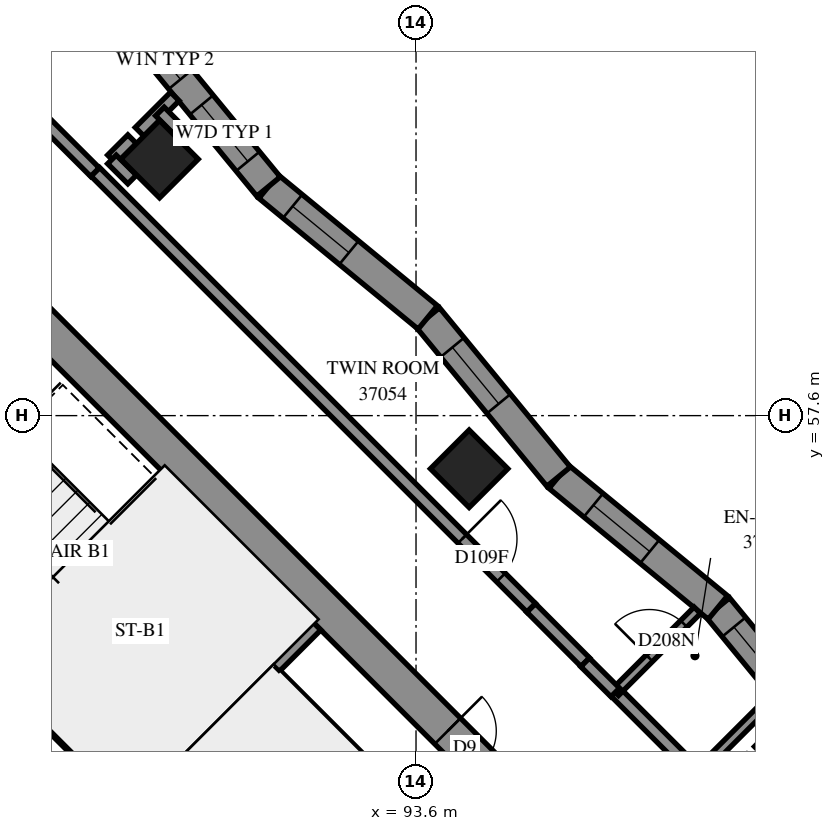
"""IFC4 building model, lengths in metres.
Left out: names, types, materials, properties, quantities, classifications, styles, units other than length and angle.
Written with IfcOpenShell. Run it as: python <this file> out.ifc"""

import sys

from ifc_helpers import new_model, si_unit, direction, frame, frame_2d, origin, origin_2d, place, context, subcontext, project, spatial, polyline, rectangle, outline, extrude, element, fill, save


model = new_model("IFC4")
c1 = context("Model", 3, precision=1e-05, world=origin(), true_north=direction((0.0, 1.0)))
c2 = subcontext(c1, "Body", "Model", "MODEL_VIEW")
j1 = project(units=[si_unit("LENGTHUNIT", "METRE"), si_unit("PLANEANGLEUNIT", "RADIAN")], contexts=[c1])
p1 = place(None, origin())
s1 = spatial("IfcSite", under=j1, at=p1, CompositionType="ELEMENT")
p2 = place(p1, origin())
s2 = spatial("IfcBuilding", under=s1, at=p2, CompositionType="ELEMENT")
p3 = place(p2, frame((0.0, 0.0, 138.8)))
s3 = spatial("IfcBuildingStorey", under=s2, at=p3, CompositionType="ELEMENT", Elevation=138.8)
for number, where, z_axis, x_axis in (
    (1, (89.382, 61.818, 0.0), (0.0, 0.0, 1.0), (0.707, -0.707, 0.0)),
    (2, (94.474, 56.727, 0.0), (0.0, 0.0, 1.0), (0.707, -0.707, 0.0)),
    (3, (99.565, 51.635, 0.0), (0.0, 0.0, 1.0), (0.707, -0.707, 0.0)),
):
    element("IfcColumn", number, at=place(p3, frame(where, z_axis=z_axis, x_axis=x_axis)), inside=s3, PredefinedType="COLUMN", context=c2, shape_type="SweptSolid", body=[
        extrude(rectangle(XDim=0.9, YDim=0.9, at=origin_2d()), origin(), (0.0, 0.0, 1.0), 3.1),
    ])
p4 = place(p3, frame((86.625, 59.908, -0.3), z_axis=(0.0, 0.0, 1.0), x_axis=(0.7071067812, -0.7071067812, 0.0)))
e4 = element("IfcWall", 4, at=p4, inside=s3, PredefinedType="SHEAR", context=c2, shape_type="SweptSolid", body=[
    extrude(rectangle(XDim=15.6, YDim=0.6, at=frame_2d((7.8, 0.0))), origin(), (0.0, 0.0, 1.0), 2.7),
])
p5 = place(p4, frame((10.6, 0.0, 0.3)))
e5 = element("IfcOpeningElement", 5, at=p5, cuts=e4, PredefinedType="OPENING", context=c2, shape_type="SweptSolid", body=[
    extrude(rectangle(XDim=0.8, YDim=2.1, at=frame_2d((0.4, 1.05))), frame((0.0, 0.31, 0.0), z_axis=(0.0, -1.0, 0.0), x_axis=(1.0, 0.0, 0.0)), (0.0, 0.0, 1.0), 0.62),
])
p6 = place(p3, frame((81.534, 53.969, 0.0), z_axis=(0.0, 0.0, 1.0), x_axis=(0.707103309, -0.7071102534, 0.0)))
e6 = element("IfcWall", 6, at=p6, inside=s3, PredefinedType="SOLIDWALL", context=c2, shape_type="SweptSolid", body=[
    extrude(rectangle(XDim=14.4, YDim=0.3, at=frame_2d((7.2, 0.0))), origin(), (0.0, 0.0, 1.0), 3.1),
])
p7 = place(p6, frame((1.25, 0.0, 0.0)))
e7 = element("IfcOpeningElement", 7, at=p7, cuts=e6, PredefinedType="OPENING", context=c2, shape_type="SweptSolid", body=[
    extrude(rectangle(XDim=1.1, YDim=2.1, at=frame_2d((0.55, 1.05))), frame((0.0, 0.16, 0.0), z_axis=(0.0, -1.0, 0.0), x_axis=(1.0, 0.0, 0.0)), (0.0, 0.0, 1.0), 0.32),
])
p8 = place(p6, frame((4.85, 0.0, 0.0)))
e8 = element("IfcOpeningElement", 8, at=p8, cuts=e6, PredefinedType="OPENING", context=c2, shape_type="SweptSolid", body=[
    extrude(rectangle(XDim=1.1, YDim=2.1, at=frame_2d((0.55, 1.05))), frame((0.0, 0.16, 0.0), z_axis=(0.0, -1.0, 0.0), x_axis=(1.0, 0.0, 0.0)), (0.0, 0.0, 1.0), 0.32),
])
p9 = place(p6, frame((8.45, 0.0, 0.0)))
e9 = element("IfcOpeningElement", 9, at=p9, cuts=e6, PredefinedType="OPENING", context=c2, shape_type="SweptSolid", body=[
    extrude(rectangle(XDim=1.1, YDim=2.1, at=frame_2d((0.55, 1.05))), frame((0.0, 0.16, 0.0), z_axis=(0.0, -1.0, 0.0), x_axis=(1.0, 0.0, 0.0)), (0.0, 0.0, 1.0), 0.32),
])
p10 = place(p6, frame((12.05, 0.0, 0.0)))
e10 = element("IfcOpeningElement", 10, at=p10, cuts=e6, PredefinedType="OPENING", context=c2, shape_type="SweptSolid", body=[
    extrude(rectangle(XDim=1.1, YDim=2.1, at=frame_2d((0.55, 1.05))), frame((0.0, 0.16, 0.0), z_axis=(0.0, -1.0, 0.0), x_axis=(1.0, 0.0, 0.0)), (0.0, 0.0, 1.0), 0.32),
])
p11 = place(p3, frame((83.867, 56.302, 0.0), z_axis=(0.0, 0.0, 1.0), x_axis=(0.7071137256, -0.7070998367, 0.0)))
e11 = element("IfcWall", 11, at=p11, inside=s3, PredefinedType="SOLIDWALL", context=c2, shape_type="SweptSolid", body=[
    extrude(rectangle(XDim=7.2, YDim=0.3, at=frame_2d((3.6, 0.0))), origin(), (0.0, 0.0, 1.0), 3.1),
])
p12 = place(p3, frame((88.958, 51.211, 0.0), z_axis=(0.0, 0.0, 1.0), x_axis=(0.7071067812, 0.7071067812, 0.0)))
e12 = element("IfcWall", 12, at=p12, inside=s3, PredefinedType="SOLIDWALL", context=c2, shape_type="SweptSolid", body=[
    extrude(rectangle(XDim=4.2, YDim=0.3, at=frame_2d((2.1, 0.0))), origin(), (0.0, 0.0, 1.0), 3.1),
])
p13 = place(p3, frame((100.716, 51.826, 0.0), z_axis=(0.0, 0.0, 1.0), x_axis=(-0.6349054988, 0.7725898055, 0.0)))
e13 = element("IfcWall", 13, at=p13, inside=s3, PredefinedType="SOLIDWALL", context=c2, shape_type="SweptSolid", body=[
    extrude(outline(polyline([(0.025, -0.25), (3.414, -0.25), (3.365, 0.25), (-0.025, 0.25), (0.025, -0.25)])), origin(), (0.0, 0.0, 1.0), 3.1),
])
p14 = place(p13, frame((1.774, 0.0, 0.45)))
e14 = element("IfcOpeningElement", 14, at=p14, cuts=e13, PredefinedType="OPENING", context=c2, shape_type="SweptSolid", body=[
    extrude(rectangle(XDim=1.2, YDim=2.5, at=frame_2d((0.6, 1.25))), frame((0.0, 0.26, 0.0), z_axis=(0.0, -1.0, 0.0), x_axis=(1.0, 0.0, 0.0)), (0.0, 0.0, 1.0), 0.52),
])
p15 = place(p3, frame((98.564, 54.445, 0.0), z_axis=(0.0, 0.0, 1.0), x_axis=(-0.7725898055, 0.6349054988, 0.0)))
e15 = element("IfcWall", 15, at=p15, inside=s3, PredefinedType="SOLIDWALL", context=c2, shape_type="SweptSolid", body=[
    extrude(outline(polyline([(-0.025, -0.25), (3.365, -0.25), (3.414, 0.25), (0.025, 0.25), (-0.025, -0.25)])), origin(), (0.0, 0.0, 1.0), 3.1),
])
p16 = place(p15, frame((1.45, 0.0, 0.45)))
e16 = element("IfcOpeningElement", 16, at=p16, cuts=e15, PredefinedType="OPENING", context=c2, shape_type="SweptSolid", body=[
    extrude(rectangle(XDim=1.2, YDim=2.5, at=frame_2d((0.6, 1.25))), frame((0.0, 0.26, 0.0), z_axis=(0.0, -1.0, 0.0), x_axis=(1.0, 0.0, 0.0)), (0.0, 0.0, 1.0), 0.52),
])
p17 = place(p3, frame((95.945, 56.597, 0.0), z_axis=(0.0, 0.0, 1.0), x_axis=(-0.6349054988, 0.7725898055, 0.0)))
e17 = element("IfcWall", 17, at=p17, inside=s3, PredefinedType="SOLIDWALL", context=c2, shape_type="SweptSolid", body=[
    extrude(outline(polyline([(0.025, -0.25), (3.414, -0.25), (3.365, 0.25), (-0.025, 0.25), (0.025, -0.25)])), origin(), (0.0, 0.0, 1.0), 3.1),
])
p18 = place(p17, frame((1.552, 0.0, 0.45)))
e18 = element("IfcOpeningElement", 18, at=p18, cuts=e17, PredefinedType="OPENING", context=c2, shape_type="SweptSolid", body=[
    extrude(rectangle(XDim=1.2, YDim=2.5, at=frame_2d((0.6, 1.25))), frame((0.0, 0.26, 0.0), z_axis=(0.0, -1.0, 0.0), x_axis=(1.0, 0.0, 0.0)), (0.0, 0.0, 1.0), 0.52),
])
p19 = place(p3, frame((93.793, 59.215, 0.0), z_axis=(0.0, 0.0, 1.0), x_axis=(-0.7725898055, 0.6349054988, 0.0)))
e19 = element("IfcWall", 19, at=p19, inside=s3, PredefinedType="SOLIDWALL", context=c2, shape_type="SweptSolid", body=[
    extrude(outline(polyline([(-0.025, -0.25), (3.365, -0.25), (3.414, 0.25), (0.025, 0.25), (-0.025, -0.25)])), origin(), (0.0, 0.0, 1.0), 3.1),
])
p20 = place(p19, frame((1.677, 0.0, 0.45)))
e20 = element("IfcOpeningElement", 20, at=p20, cuts=e19, PredefinedType="OPENING", context=c2, shape_type="SweptSolid", body=[
    extrude(rectangle(XDim=1.2, YDim=2.5, at=frame_2d((0.6, 1.25))), frame((0.0, 0.26, 0.0), z_axis=(0.0, -1.0, 0.0), x_axis=(1.0, 0.0, 0.0)), (0.0, 0.0, 1.0), 0.52),
])
p21 = place(p3, frame((91.174, 61.368, 0.0), z_axis=(0.0, 0.0, 1.0), x_axis=(-0.6349199703, 0.7725779128, 0.0)))
e21 = element("IfcWall", 21, at=p21, inside=s3, PredefinedType="SOLIDWALL", context=c2, shape_type="SweptSolid", body=[
    extrude(outline(polyline([(0.025, -0.25), (3.414, -0.25), (3.365, 0.25), (-0.025, 0.25), (0.025, -0.25)])), origin(), (0.0, 0.0, 1.0), 3.1),
])
p22 = place(p21, frame((0.536, 0.0, 0.5)))
e22 = element("IfcOpeningElement", 22, at=p22, cuts=e21, PredefinedType="OPENING", context=c2, shape_type="SweptSolid", body=[
    extrude(rectangle(XDim=1.2, YDim=2.45, at=frame_2d((0.6, 1.225))), frame((0.0, 0.26, 0.0), z_axis=(0.0, -1.0, 0.0), x_axis=(1.0, 0.0, 0.0)), (0.0, 0.0, 1.0), 0.52),
])
p23 = place(p21, frame((2.281, 0.0, 0.45)))
e23 = element("IfcOpeningElement", 23, at=p23, cuts=e21, PredefinedType="OPENING", context=c2, shape_type="SweptSolid", body=[
    extrude(rectangle(XDim=0.8, YDim=2.5, at=frame_2d((0.4, 1.25))), frame((0.0, 0.26, 0.0), z_axis=(0.0, -1.0, 0.0), x_axis=(1.0, 0.0, 0.0)), (0.0, 0.0, 1.0), 0.52),
])
p24 = place(p3, frame((91.313, 53.354, 0.0), z_axis=(0.0, 0.0, 1.0), x_axis=(0.7071140275, -0.7070995348, 0.0)))
e24 = element("IfcWall", 24, at=p24, inside=s3, PredefinedType="PARTITIONING", context=c2, shape_type="SweptSolid", body=[
    extrude(rectangle(XDim=6.9, YDim=0.15, at=frame_2d((3.45, 0.0))), origin(), (0.0, 0.0, 1.0), 3.1),
])
p25 = place(p3, frame((88.326, 61.609, 0.0), z_axis=(0.0, 0.0, 1.0), x_axis=(0.7071067812, -0.7071067812, 0.0)))
e25 = element("IfcWall", 25, at=p25, inside=s3, PredefinedType="PARTITIONING", context=c2, shape_type="SweptSolid", body=[
    extrude(rectangle(XDim=10.14, YDim=0.2, at=frame_2d((5.07, 0.0))), origin(), (0.0, 0.0, 1.0), 3.1),
])
p26 = place(p25, frame((8.535, 0.0, 0.0)))
e26 = element("IfcOpeningElement", 26, at=p26, cuts=e25, PredefinedType="OPENING", context=c2, shape_type="SweptSolid", body=[
    extrude(rectangle(XDim=0.9, YDim=2.1, at=frame_2d((0.45, 1.05))), frame((0.0, 0.11, 0.0), z_axis=(0.0, -1.0, 0.0), x_axis=(1.0, 0.0, 0.0)), (0.0, 0.0, 1.0), 0.22),
])
p27 = place(p3, frame((86.834, 63.088, 0.0), z_axis=(0.0, 0.0, 1.0), x_axis=(0.7075827869, -0.7066304548, 0.0)))
e27 = element("IfcWall", 27, at=p27, inside=s3, PredefinedType="PARTITIONING", context=c2, shape_type="SweptSolid", body=[
    extrude(rectangle(XDim=2.1, YDim=0.2, at=frame_2d((1.05, 0.0))), origin(), (0.0, 0.0, 1.0), 3.1),
])
p28 = place(p3, frame((96.882, 53.053, 0.0), z_axis=(0.0, 0.0, 1.0), x_axis=(0.7071067812, -0.7071067812, 0.0)))
e28 = element("IfcWall", 28, at=p28, inside=s3, PredefinedType="PARTITIONING", context=c2, shape_type="SweptSolid", body=[
    extrude(rectangle(XDim=1.901, YDim=0.2, at=frame_2d((0.95, 0.0))), origin(), (0.0, 0.0, 1.0), 3.1),
])
p29 = place(p3, frame((96.877, 53.051, 0.0), z_axis=(0.0, 0.0, 1.0), x_axis=(0.7071330019, 0.7070805595, 0.0)))
e29 = element("IfcWall", 29, at=p29, inside=s3, PredefinedType="PARTITIONING", context=c2, shape_type="SweptSolid", body=[
    extrude(rectangle(XDim=1.907, YDim=0.15, at=frame_2d((0.954, 0.0))), origin(), (0.0, 0.0, 1.0), 3.1),
])
p30 = place(p29, frame((0.793, 0.0, 0.0)))
e30 = element("IfcOpeningElement", 30, at=p30, cuts=e29, PredefinedType="OPENING", context=c2, shape_type="SweptSolid", body=[
    extrude(rectangle(XDim=0.8, YDim=2.1, at=frame_2d((0.4, 1.05))), frame((0.0, 0.085, 0.0), z_axis=(0.0, -1.0, 0.0), x_axis=(1.0, 0.0, 0.0)), (0.0, 0.0, 1.0), 0.17),
])
p31 = place(p3, frame((98.221, 51.707, 0.0), z_axis=(0.0, 0.0, 1.0), x_axis=(0.7071351659, 0.7070783953, 0.0)))
e31 = element("IfcWall", 31, at=p31, inside=s3, PredefinedType="PARTITIONING", context=c2, shape_type="SweptSolid", body=[
    extrude(rectangle(XDim=1.762, YDim=0.15, at=frame_2d((0.881, 0.0))), origin(), (0.0, 0.0, 1.0), 3.1),
])
p32 = place(p3, frame((95.494, 54.438, 0.0), z_axis=(0.0, 0.0, 1.0), x_axis=(0.706312726, -0.7078999456, 0.0)))
e32 = element("IfcWall", 32, at=p32, inside=s3, PredefinedType="PARTITIONING", context=c2, shape_type="SweptSolid", body=[
    extrude(rectangle(XDim=1.26, YDim=0.2, at=frame_2d((0.63, 0.0))), origin(), (0.0, 0.0, 1.0), 3.1),
])
p33 = place(p3, frame((96.38, 53.542, 0.0), z_axis=(0.0, 0.0, 1.0), x_axis=(0.7085338339, -0.7056768426, 0.0)))
e33 = element("IfcWall", 33, at=p33, inside=s3, PredefinedType="PARTITIONING", context=c2, shape_type="SweptSolid", body=[
    extrude(rectangle(XDim=0.7, YDim=0.2, at=frame_2d((0.35, 0.0))), origin(), (0.0, 0.0, 1.0), 3.1),
])
p34 = place(p3, frame((88.6, 61.814, 0.0), z_axis=(0.0, 0.0, 1.0), x_axis=(0.7071067812, 0.7071067812, 0.0)))
e34 = element("IfcWall", 34, at=p34, inside=s3, PredefinedType="PARTITIONING", context=c2, shape_type="SweptSolid", body=[
    extrude(rectangle(XDim=0.469, YDim=0.2, at=frame_2d((0.235, 0.0))), origin(), (0.0, 0.0, 1.0), 3.1),
])
p35 = place(p3, frame((89.054, 62.268, 0.0), z_axis=(0.0, 0.0, 1.0), x_axis=(0.7071067812, 0.7071067812, 0.0)))
e35 = element("IfcWall", 35, at=p35, inside=s3, PredefinedType="PARTITIONING", context=c2, shape_type="SweptSolid", body=[
    extrude(rectangle(XDim=0.82, YDim=0.2, at=frame_2d((0.41, 0.0))), origin(), (0.0, 0.0, 1.0), 3.1),
])
for number, where, z_axis, x_axis in (
    (36, (88.599, 61.813, 0.0), (0.0, 0.0, 1.0), (0.709, -0.705, 0.0)),
    (37, (89.388, 62.602, 0.0), (0.0, 0.0, 1.0), (0.705, -0.709, 0.0)),
):
    element("IfcWall", number, at=place(p3, frame(where, z_axis=z_axis, x_axis=x_axis)), inside=s3, PredefinedType="PARTITIONING", context=c2, shape_type="SweptSolid", body=[
        extrude(rectangle(XDim=0.468, YDim=0.2, at=frame_2d((0.234, 0.0))), origin(), (0.0, 0.0, 1.0), 3.1),
    ])
p36 = place(p3, frame((99.237, 52.087, 0.0), z_axis=(0.0, 0.0, 1.0), x_axis=(0.7071752363, 0.7070383195, 0.0)))
e38 = element("IfcWall", 38, at=p36, inside=s3, PredefinedType="PARTITIONING", context=c2, shape_type="SweptSolid", body=[
    extrude(rectangle(XDim=0.73, YDim=0.2, at=frame_2d((0.365, 0.0))), origin(), (0.0, 0.0, 1.0), 3.1),
])
p37 = place(p14, origin())
e39 = element("IfcWindow", 39, at=p37, inside=s3, PartitioningType="SINGLE_PANEL", PredefinedType="WINDOW", context=c2, shape_type="SweptSolid", body=[
    extrude(rectangle(XDim=1.2, YDim=2.5, at=frame_2d((0.6, 1.25))), frame((0.0, 0.18, 0.0), z_axis=(0.0, -1.0, 0.0), x_axis=(1.0, 0.0, 0.0)), (0.0, 0.0, 1.0), 0.06),
])
fill(e14, e39)
p38 = place(p16, origin())
e40 = element("IfcWindow", 40, at=p38, inside=s3, PartitioningType="SINGLE_PANEL", PredefinedType="WINDOW", context=c2, shape_type="SweptSolid", body=[
    extrude(rectangle(XDim=1.2, YDim=2.5, at=frame_2d((0.6, 1.25))), frame((0.0, 0.18, 0.0), z_axis=(0.0, -1.0, 0.0), x_axis=(1.0, 0.0, 0.0)), (0.0, 0.0, 1.0), 0.06),
])
fill(e16, e40)
p39 = place(p18, origin())
e41 = element("IfcWindow", 41, at=p39, inside=s3, PartitioningType="SINGLE_PANEL", PredefinedType="WINDOW", context=c2, shape_type="SweptSolid", body=[
    extrude(rectangle(XDim=1.2, YDim=2.5, at=frame_2d((0.6, 1.25))), frame((0.0, 0.18, 0.0), z_axis=(0.0, -1.0, 0.0), x_axis=(1.0, 0.0, 0.0)), (0.0, 0.0, 1.0), 0.06),
])
fill(e18, e41)
p40 = place(p20, origin())
e42 = element("IfcWindow", 42, at=p40, inside=s3, PartitioningType="SINGLE_PANEL", PredefinedType="WINDOW", context=c2, shape_type="SweptSolid", body=[
    extrude(rectangle(XDim=1.2, YDim=2.5, at=frame_2d((0.6, 1.25))), frame((0.0, 0.18, 0.0), z_axis=(0.0, -1.0, 0.0), x_axis=(1.0, 0.0, 0.0)), (0.0, 0.0, 1.0), 0.06),
])
fill(e20, e42)
p41 = place(p5, origin())
e43 = element("IfcDoor", 43, at=p41, inside=s3, OperationType="SINGLE_SWING_RIGHT", PredefinedType="DOOR", context=c2, shape_type="SweptSolid", body=[
    extrude(rectangle(XDim=0.8, YDim=2.1, at=frame_2d((0.4, 1.05))), frame((0.0, 0.025, 0.0), z_axis=(0.0, -1.0, 0.0), x_axis=(1.0, 0.0, 0.0)), (0.0, 0.0, 1.0), 0.05),
])
fill(e5, e43)
p42 = place(p26, origin())
e44 = element("IfcDoor", 44, at=p42, inside=s3, OperationType="SINGLE_SWING_LEFT", PredefinedType="DOOR", context=c2, shape_type="SweptSolid", body=[
    extrude(rectangle(XDim=0.9, YDim=2.1, at=frame_2d((0.45, 1.05))), frame((0.0, 0.025, 0.0), z_axis=(0.0, -1.0, 0.0), x_axis=(1.0, 0.0, 0.0)), (0.0, 0.0, 1.0), 0.05),
])
fill(e26, e44)
p43 = place(p30, origin())
e45 = element("IfcDoor", 45, at=p43, inside=s3, OperationType="SINGLE_SWING_RIGHT", PredefinedType="DOOR", context=c2, shape_type="SweptSolid", body=[
    extrude(rectangle(XDim=0.8, YDim=2.1, at=frame_2d((0.4, 1.05))), frame((0.0, 0.025, 0.0), z_axis=(0.0, -1.0, 0.0), x_axis=(1.0, 0.0, 0.0)), (0.0, 0.0, 1.0), 0.05),
])
fill(e30, e45)
p44 = place(p22, origin())
e46 = element("IfcWindow", 46, at=p44, inside=s3, PartitioningType="SINGLE_PANEL", PredefinedType="WINDOW", context=c2, shape_type="SweptSolid", body=[
    extrude(rectangle(XDim=1.2, YDim=2.45, at=frame_2d((0.6, 1.225))), frame((0.0, 0.18, 0.0), z_axis=(0.0, -1.0, 0.0), x_axis=(1.0, 0.0, 0.0)), (0.0, 0.0, 1.0), 0.06),
])
fill(e22, e46)
p45 = place(p23, origin())
e47 = element("IfcWindow", 47, at=p45, inside=s3, PartitioningType="SINGLE_PANEL", PredefinedType="WINDOW", context=c2, shape_type="SweptSolid", body=[
    extrude(rectangle(XDim=0.8, YDim=2.5, at=frame_2d((0.4, 1.25))), frame((0.0, 0.18, 0.0), z_axis=(0.0, -1.0, 0.0), x_axis=(1.0, 0.0, 0.0)), (0.0, 0.0, 1.0), 0.06),
])
fill(e23, e47)
save(model, sys.argv[1])
